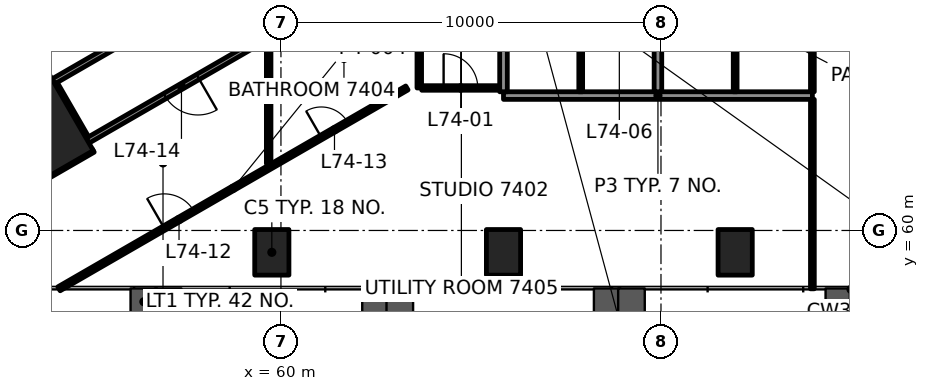
"""IFC4 building model, lengths in metres.
Left out: names, types, materials, properties, quantities, classifications, styles, units other than length and angle.
Written with IfcOpenShell. Run it as: python <this file> out.ifc"""

import sys

from ifc_helpers import new_model, si_unit, direction, frame, frame_2d, origin, origin_2d, place, context, subcontext, project, spatial, rectangle, hollow_rectangle, extrude, element, fill, save


model = new_model("IFC4")
c1 = context("Model", 3, precision=1e-05, world=origin(), true_north=direction((0.0, 1.0)))
c2 = subcontext(c1, "Body", "Model", "MODEL_VIEW")
j1 = project(units=[si_unit("LENGTHUNIT", "METRE"), si_unit("PLANEANGLEUNIT", "RADIAN")], contexts=[c1])
p1 = place(None, origin())
s1 = spatial("IfcSite", under=j1, at=p1, CompositionType="ELEMENT")
p2 = place(p1, origin())
s2 = spatial("IfcBuilding", under=s1, at=p2, CompositionType="ELEMENT")
p3 = place(p2, frame((0.0, 0.0, 305.6)))
s3 = spatial("IfcBuildingStorey", under=s2, at=p3, CompositionType="ELEMENT", Elevation=305.6)
p4 = place(p3, frame((53.423, 62.542, 0.0), z_axis=(0.0, 0.0, 1.0), x_axis=(0.5, -0.866025403784, 0.0)))
e1 = element("IfcColumn", 1, at=p4, inside=s3, PredefinedType="COLUMN", context=c2, shape_type="SweptSolid", body=[
    extrude(rectangle(XDim=2.4, YDim=2.4, at=origin_2d()), origin(), (0.0, 0.0, 1.0), 3.5),
])
for number, where, z_axis, x_axis in (
    (2, (59.76, 59.425, -0.0), (0.0, 0.0, 1.0), (1.0, 0.0, 0.0)),
    (3, (65.856, 59.425, -0.0), (0.0, 0.0, 1.0), (1.0, 0.0, 0.0)),
    (4, (71.952, 59.425, -0.0), (0.0, 0.0, 1.0), (1.0, 0.0, 0.0)),
):
    element("IfcColumn", number, at=place(p3, frame(where, z_axis=z_axis, x_axis=x_axis)), inside=s3, PredefinedType="COLUMN", context=c2, shape_type="SweptSolid", body=[
        extrude(hollow_rectangle(XDim=0.9, YDim=1.2, WallThickness=0.06, at=origin_2d()), origin(), (0.0, 0.0, 1.0), 3.5),
    ])
p5 = place(p3, frame((65.856, 63.55, 0.0), z_axis=(0.0, 0.0, 1.0), x_axis=(1.0, 0.0, 0.0)))
e5 = element("IfcWall", 5, at=p5, inside=s3, PredefinedType="PARTITIONING", context=c2, shape_type="SweptSolid", body=[
    extrude(rectangle(XDim=8.128, YDim=0.2, at=frame_2d((4.064, 0.0))), origin(), (0.0, 0.0, 1.0), 2.7),
])
p6 = place(p3, frame((63.704, 63.75, 0.0), z_axis=(0.0, 0.0, 1.0), x_axis=(1.0, 0.0, 0.0)))
e6 = element("IfcWall", 6, at=p6, inside=s3, PredefinedType="PARTITIONING", context=c2, shape_type="SweptSolid", body=[
    extrude(rectangle(XDim=2.052, YDim=0.12, at=frame_2d((1.026, 0.0))), origin(), (0.0, 0.0, 1.0), 2.7),
])
p7 = place(p6, frame((0.576, 0.0, 0.0)))
e7 = element("IfcOpeningElement", 7, at=p7, cuts=e6, PredefinedType="OPENING", context=c2, shape_type="SweptSolid", body=[
    extrude(rectangle(XDim=0.9, YDim=2.1, at=frame_2d((0.45, 1.05))), frame((0.0, 0.07, 0.0), z_axis=(0.0, -1.0, 0.0), x_axis=(1.0, 0.0, 0.0)), (0.0, 0.0, 1.0), 0.14),
])
p8 = place(p3, frame((54.16, 58.465, 0.0), z_axis=(0.0, 0.0, 1.0), x_axis=(0.866034434898, 0.499984357326, 0.0)))
e8 = element("IfcWall", 8, at=p8, inside=s3, PredefinedType="PARTITIONING", context=c2, shape_type="SweptSolid", body=[
    extrude(rectangle(XDim=10.571, YDim=0.12, at=frame_2d((5.285, 0.0))), origin(), (0.0, 0.0, 1.0), 2.7),
])
p9 = place(p8, frame((3.197, 0.0, 0.0)))
e9 = element("IfcOpeningElement", 9, at=p9, cuts=e8, PredefinedType="OPENING", context=c2, shape_type="SweptSolid", body=[
    extrude(rectangle(XDim=0.9, YDim=2.1, at=frame_2d((0.45, 1.05))), frame((0.0, 0.07, 0.0), z_axis=(0.0, -1.0, 0.0), x_axis=(1.0, 0.0, 0.0)), (0.0, 0.0, 1.0), 0.14),
])
p10 = place(p8, frame((7.97, 0.0, 0.0)))
e10 = element("IfcOpeningElement", 10, at=p10, cuts=e8, PredefinedType="OPENING", context=c2, shape_type="SweptSolid", body=[
    extrude(rectangle(XDim=0.8, YDim=2.1, at=frame_2d((0.4, 1.05))), frame((0.0, 0.07, 0.0), z_axis=(0.0, -1.0, 0.0), x_axis=(1.0, 0.0, 0.0)), (0.0, 0.0, 1.0), 0.14),
])
p11 = place(p3, frame((52.984, 60.904, 0.0), z_axis=(0.0, 0.0, 1.0), x_axis=(0.866011011868, 0.500024926702, 0.0)))
e11 = element("IfcWall", 11, at=p11, inside=s3, PredefinedType="PARTITIONING", context=c2, shape_type="SweptSolid", body=[
    extrude(rectangle(XDim=2.399, YDim=0.1, at=frame_2d((1.199, 0.0))), origin(), (0.0, 0.0, 1.0), 2.7),
])
p12 = place(p3, frame((65.0, 68.187, 0.0), z_axis=(0.0, 0.0, 1.0), x_axis=(-0.866026430432, -0.49999822179, 0.0)))
e12 = element("IfcWall", 12, at=p12, inside=s3, PredefinedType="PARTITIONING", context=c2, shape_type="SweptSolid", body=[
    extrude(rectangle(XDim=11.648, YDim=0.15, at=frame_2d((5.824, 0.0))), origin(), (0.0, 0.0, 1.0), 2.547),
])
p13 = place(p12, frame((8.296, 0.0, 0.0)))
e13 = element("IfcOpeningElement", 13, at=p13, cuts=e12, PredefinedType="OPENING", context=c2, shape_type="SweptSolid", body=[
    extrude(rectangle(XDim=1.0, YDim=2.1, at=frame_2d((0.5, 1.05))), frame((0.0, 0.085, 0.0), z_axis=(0.0, -1.0, 0.0), x_axis=(1.0, 0.0, 0.0)), (0.0, 0.0, 1.0), 0.17),
])
p14 = place(p3, frame((54.012, 63.922, 0.0), z_axis=(0.0, 0.0, 1.0), x_axis=(0.866028779199, 0.499994153564, 0.0)))
e14 = element("IfcWall", 14, at=p14, inside=s3, PredefinedType="PARTITIONING", context=c2, shape_type="SweptSolid", body=[
    extrude(rectangle(XDim=12.601, YDim=0.15, at=frame_2d((6.3, 0.0))), origin(), (0.0, 0.0, 1.0), 2.7),
])
p15 = place(p14, frame((2.542, 0.0, 0.0)))
e15 = element("IfcOpeningElement", 15, at=p15, cuts=e14, PredefinedType="OPENING", context=c2, shape_type="SweptSolid", body=[
    extrude(rectangle(XDim=1.0, YDim=2.1, at=frame_2d((0.5, 1.05))), frame((0.0, 0.085, 0.0), z_axis=(0.0, -1.0, 0.0), x_axis=(1.0, 0.0, 0.0)), (0.0, 0.0, 1.0), 0.17),
])
p16 = place(p14, frame((8.639, 0.0, 0.0)))
e16 = element("IfcOpeningElement", 16, at=p16, cuts=e14, PredefinedType="OPENING", context=c2, shape_type="SweptSolid", body=[
    extrude(rectangle(XDim=1.0, YDim=2.1, at=frame_2d((0.5, 1.05))), frame((0.0, 0.085, 0.0), z_axis=(0.0, -1.0, 0.0), x_axis=(1.0, 0.0, 0.0)), (0.0, 0.0, 1.0), 0.17),
])
p17 = place(p3, frame((73.984, 58.465, 0.0), z_axis=(0.0, 0.0, 1.0), x_axis=(0.0, 1.0, 0.0)))
e17 = element("IfcWall", 17, at=p17, inside=s3, PredefinedType="PARTITIONING", context=c2, shape_type="SweptSolid", body=[
    extrude(rectangle(XDim=4.985, YDim=0.1, at=frame_2d((2.493, 0.0))), origin(), (0.0, 0.0, 1.0), 2.688),
])
p18 = place(p3, frame((71.952, 63.65, 0.0), z_axis=(0.0, 0.0, 1.0), x_axis=(0.0, 1.0, 0.0)))
e18 = element("IfcWall", 18, at=p18, inside=s3, PredefinedType="PARTITIONING", context=c2, shape_type="SweptSolid", body=[
    extrude(rectangle(XDim=3.025, YDim=0.1, at=frame_2d((1.513, 0.0))), origin(), (0.0, 0.0, 1.0), 2.7),
])
p19 = place(p3, frame((69.92, 63.65, 0.0), z_axis=(0.0, 0.0, 1.0), x_axis=(0.0, 1.0, 0.0)))
e19 = element("IfcWall", 19, at=p19, inside=s3, PredefinedType="PARTITIONING", context=c2, shape_type="SweptSolid", body=[
    extrude(rectangle(XDim=3.025, YDim=0.2, at=frame_2d((1.513, 0.0))), origin(), (0.0, 0.0, 1.0), 2.7),
])
p20 = place(p3, frame((67.888, 63.65, 0.0), z_axis=(0.0, 0.0, 1.0), x_axis=(0.0, 1.0, 0.0)))
e20 = element("IfcWall", 20, at=p20, inside=s3, PredefinedType="PARTITIONING", context=c2, shape_type="SweptSolid", body=[
    extrude(rectangle(XDim=3.025, YDim=0.1, at=frame_2d((1.513, 0.0))), origin(), (0.0, 0.0, 1.0), 2.7),
])
p21 = place(p3, frame((65.856, 63.65, 0.0), z_axis=(0.0, 0.0, 1.0), x_axis=(0.0, 1.0, 0.0)))
e21 = element("IfcWall", 21, at=p21, inside=s3, PredefinedType="PARTITIONING", context=c2, shape_type="SweptSolid", body=[
    extrude(rectangle(XDim=3.025, YDim=0.2, at=frame_2d((1.513, 0.0))), origin(), (0.0, 0.0, 1.0), 2.7),
])
p22 = place(p3, frame((63.64, 63.75, 0.0), z_axis=(0.0, 0.0, 1.0), x_axis=(0.0, 1.0, 0.0)))
e22 = element("IfcWall", 22, at=p22, inside=s3, PredefinedType="PARTITIONING", context=c2, shape_type="SweptSolid", body=[
    extrude(rectangle(XDim=3.525, YDim=0.12, at=frame_2d((1.763, 0.0))), origin(), (0.0, 0.0, 1.0), 2.547),
])
p23 = place(p3, frame((59.677, 61.759, 0.0), z_axis=(0.0, 0.0, 1.0), x_axis=(0.0, 1.0, 0.0)))
e23 = element("IfcWall", 23, at=p23, inside=s3, PredefinedType="PARTITIONING", context=c2, shape_type="SweptSolid", body=[
    extrude(rectangle(XDim=3.228, YDim=0.12, at=frame_2d((1.614, 0.0))), origin(), (0.0, 0.0, 1.0), 2.7),
])
p24 = place(p3, frame((54.872, 62.433, 0.0), z_axis=(0.0, 0.0, 1.0), x_axis=(-0.499988108725, 0.866032269107, 0.0)))
e24 = element("IfcWall", 24, at=p24, inside=s3, PredefinedType="PARTITIONING", context=c2, shape_type="SweptSolid", body=[
    extrude(rectangle(XDim=1.644, YDim=0.15, at=frame_2d((0.822, 0.0))), origin(), (0.0, 0.0, 1.0), 2.547),
])
p25 = place(p3, frame((73.984, 63.65, 0.0), z_axis=(0.0, 0.0, 1.0), x_axis=(0.0, 1.0, 0.0)))
e25 = element("IfcWall", 25, at=p25, inside=s3, PredefinedType="PARTITIONING", context=c2, shape_type="SweptSolid", body=[
    extrude(rectangle(XDim=3.025, YDim=0.1, at=frame_2d((1.513, 0.0))), origin(), (0.0, 0.0, 1.0), 2.7),
])
p26 = place(p7, origin())
e26 = element("IfcDoor", 26, at=p26, inside=s3, OperationType="SINGLE_SWING_LEFT", PredefinedType="DOOR", context=c2, shape_type="SweptSolid", body=[
    extrude(rectangle(XDim=0.9, YDim=2.1, at=frame_2d((0.45, 1.05))), frame((0.0, 0.025, 0.0), z_axis=(0.0, -1.0, 0.0), x_axis=(1.0, 0.0, 0.0)), (0.0, 0.0, 1.0), 0.05),
])
fill(e7, e26)
p27 = place(p9, origin())
e27 = element("IfcDoor", 27, at=p27, inside=s3, OperationType="SINGLE_SWING_RIGHT", PredefinedType="DOOR", context=c2, shape_type="SweptSolid", body=[
    extrude(rectangle(XDim=0.9, YDim=2.1, at=frame_2d((0.45, 1.05))), frame((0.0, 0.025, 0.0), z_axis=(0.0, -1.0, 0.0), x_axis=(1.0, 0.0, 0.0)), (0.0, 0.0, 1.0), 0.05),
])
fill(e9, e27)
p28 = place(p10, origin())
e28 = element("IfcDoor", 28, at=p28, inside=s3, OperationType="SINGLE_SWING_RIGHT", PredefinedType="DOOR", context=c2, shape_type="SweptSolid", body=[
    extrude(rectangle(XDim=0.8, YDim=2.1, at=frame_2d((0.4, 1.05))), frame((0.0, 0.025, 0.0), z_axis=(0.0, -1.0, 0.0), x_axis=(1.0, 0.0, 0.0)), (0.0, 0.0, 1.0), 0.05),
])
fill(e10, e28)
p29 = place(p13, origin())
e29 = element("IfcDoor", 29, at=p29, inside=s3, OperationType="SINGLE_SWING_RIGHT", PredefinedType="DOOR", context=c2, shape_type="SweptSolid", body=[
    extrude(rectangle(XDim=1.0, YDim=2.1, at=frame_2d((0.5, 1.05))), frame((0.0, 0.025, 0.0), z_axis=(0.0, -1.0, 0.0), x_axis=(1.0, 0.0, 0.0)), (0.0, 0.0, 1.0), 0.05),
])
fill(e13, e29)
save(model, sys.argv[1])
